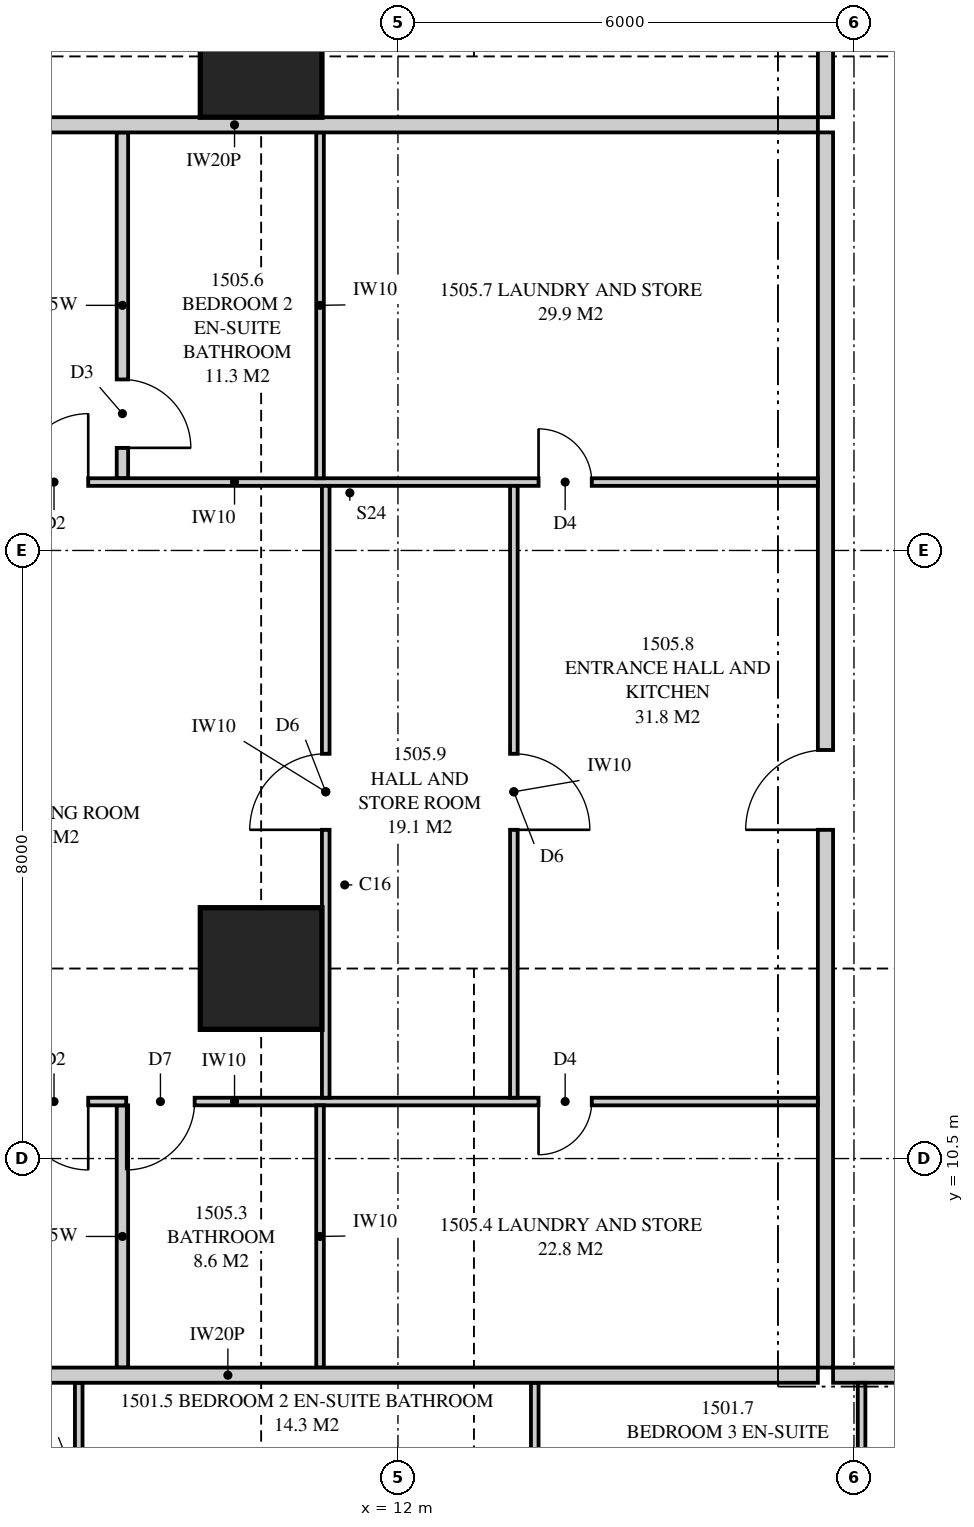
"""IFC4 building model, lengths in metres.
Left out: names, types, materials, properties, quantities, classifications, styles, units other than length and angle.
Written with IfcOpenShell. Run it as: python <this file> out.ifc"""

import sys

from ifc_helpers import new_model, si_unit, direction, frame, frame_2d, origin, origin_2d, place, context, subcontext, project, spatial, polyline, rectangle, outline, extrude, element, fill, save


model = new_model("IFC4")
c1 = context("Model", 3, precision=1e-05, world=origin(), true_north=direction((0.0, 1.0)))
c2 = subcontext(c1, "Body", "Model", "MODEL_VIEW")
j1 = project(units=[si_unit("LENGTHUNIT", "METRE"), si_unit("PLANEANGLEUNIT", "RADIAN")], contexts=[c1])
p1 = place(None, origin())
s1 = spatial("IfcSite", under=j1, at=p1, CompositionType="ELEMENT")
p2 = place(p1, origin())
s2 = spatial("IfcBuilding", under=s1, at=p2, CompositionType="ELEMENT")
p3 = place(p2, frame((0.0, 0.0, 57.85)))
s3 = spatial("IfcBuildingStorey", under=s2, at=p3, CompositionType="ELEMENT", Elevation=57.85)
for number, where, z_axis, x_axis in (
    (1, (10.2, 13.0, 0.0), (0.0, 0.0, 1.0), (1.0, 0.0, 0.0)),
    (2, (10.2, 25.0, 0.0), (0.0, 0.0, 1.0), (1.0, 0.0, 0.0)),
):
    element("IfcColumn", number, at=place(p3, frame(where, z_axis=z_axis, x_axis=x_axis)), inside=s3, PredefinedType="COLUMN", context=c2, shape_type="SweptSolid", body=[
        extrude(rectangle(XDim=1.6, YDim=1.6, at=origin_2d()), origin(), (0.0, 0.0, 1.0), 3.35),
    ])
p4 = place(p3, frame((17.725, 7.65, 0.0), z_axis=(0.0, 0.0, 1.0), x_axis=(1.0, 0.0, 0.0)))
e3 = element("IfcWall", 3, at=p4, inside=s3, PredefinedType="PARTITIONING", context=c2, shape_type="SweptSolid", body=[
    extrude(rectangle(XDim=3.525, YDim=0.2, at=frame_2d((1.762, 0.0))), origin(), (0.0, 0.0, 1.0), 3.11),
])
p5 = place(p3, frame((7.8, 0.175, 0.0), z_axis=(0.0, 0.0, 1.0), x_axis=(0.0, 1.0, 0.0)))
e4 = element("IfcWall", 4, at=p5, inside=s3, PredefinedType="PARTITIONING", context=c2, shape_type="SweptSolid", body=[
    extrude(outline(polyline([(0.0, 0.0), (7.375, 0.0), (7.375, 3.11), (2.697, 3.11), (2.697, 2.15), (0.943, 2.15), (0.943, 3.11), (0.0, 3.11), (0.0, 0.0)])), frame((0.0, 0.05, 0.0), z_axis=(0.0, -1.0, 0.0), x_axis=(1.0, 0.0, 0.0)), (0.0, 0.0, 1.0), 0.1),
])
p6 = place(p5, frame((2.772, 0.0, 0.0)))
e5 = element("IfcOpeningElement", 5, at=p6, cuts=e4, PredefinedType="OPENING", context=c2, shape_type="SweptSolid", body=[
    extrude(rectangle(XDim=0.9, YDim=2.1, at=frame_2d((0.45, 1.05))), frame((0.0, 0.06, 0.0), z_axis=(0.0, -1.0, 0.0), x_axis=(1.0, 0.0, 0.0)), (0.0, 0.0, 1.0), 0.12),
])
p7 = place(p5, frame((5.523, 0.0, 0.0)))
e6 = element("IfcOpeningElement", 6, at=p7, cuts=e4, PredefinedType="OPENING", context=c2, shape_type="SweptSolid", body=[
    extrude(rectangle(XDim=0.9, YDim=2.1, at=frame_2d((0.45, 1.05))), frame((0.0, 0.06, 0.0), z_axis=(0.0, -1.0, 0.0), x_axis=(1.0, 0.0, 0.0)), (0.0, 0.0, 1.0), 0.12),
])
p8 = place(p3, frame((13.8, 0.175, 0.0), z_axis=(0.0, 0.0, 1.0), x_axis=(0.0, 1.0, 0.0)))
e7 = element("IfcWall", 7, at=p8, inside=s3, PredefinedType="PARTITIONING", context=c2, shape_type="SweptSolid", body=[
    extrude(outline(polyline([(1.635, 2.15), (0.0, 2.15), (0.0, 0.0), (7.375, 0.0), (7.375, 3.11), (1.635, 3.11), (1.635, 2.15)]), holes=[polyline([(1.021, 0.133), (0.529, 0.133), (0.529, 0.923), (1.021, 0.923), (1.021, 0.133)]), polyline([(1.021, 1.227), (0.529, 1.227), (0.529, 2.017), (1.021, 2.017), (1.021, 1.227)])]), frame((0.0, 0.05, 0.0), z_axis=(0.0, -1.0, 0.0), x_axis=(1.0, 0.0, 0.0)), (0.0, 0.0, 1.0), 0.1),
])
p9 = place(p8, frame((3.525, 0.0, 0.0)))
e8 = element("IfcOpeningElement", 8, at=p9, cuts=e7, PredefinedType="OPENING", context=c2, shape_type="SweptSolid", body=[
    extrude(rectangle(XDim=0.9, YDim=2.1, at=frame_2d((0.45, 1.05))), frame((0.0, 0.06, 0.0), z_axis=(0.0, -1.0, 0.0), x_axis=(1.0, 0.0, 0.0)), (0.0, 0.0, 1.0), 0.12),
])
p10 = place(p3, frame((18.1, 0.175, 0.0), z_axis=(0.0, 0.0, 1.0), x_axis=(0.0, 1.0, 0.0)))
e9 = element("IfcWall", 9, at=p10, inside=s3, PredefinedType="PARTITIONING", context=c2, shape_type="SweptSolid", body=[
    extrude(outline(polyline([(0.0, 0.0), (7.375, 0.0), (7.375, 3.11), (1.635, 3.11), (1.635, 2.15), (0.0, 2.15), (0.0, 3.11), (0.0, 0.0)])), frame((0.0, 0.05, 0.0), z_axis=(0.0, -1.0, 0.0), x_axis=(1.0, 0.0, 0.0)), (0.0, 0.0, 1.0), 0.1),
])
p11 = place(p10, frame((3.525, 0.0, 0.0)))
e10 = element("IfcOpeningElement", 10, at=p11, cuts=e9, PredefinedType="OPENING", context=c2, shape_type="SweptSolid", body=[
    extrude(rectangle(XDim=0.9, YDim=2.1, at=frame_2d((0.45, 1.05))), frame((0.0, 0.06, 0.0), z_axis=(0.0, -1.0, 0.0), x_axis=(1.0, 0.0, 0.0)), (0.0, 0.0, 1.0), 0.12),
])
p12 = place(p3, frame((2.0, 7.65, 0.0), z_axis=(0.0, 0.0, 1.0), x_axis=(1.0, 0.0, 0.0)))
e11 = element("IfcWall", 11, at=p12, inside=s3, PredefinedType="PARTITIONING", context=c2, shape_type="SweptSolid", body=[
    extrude(outline(polyline([(0.0, 0.0), (15.525, 0.0), (15.525, 3.11), (11.337, 3.11), (11.337, 2.541), (10.663, 2.541), (10.663, 3.11), (9.51, 3.11), (9.51, 2.51), (6.89, 2.51), (6.89, 3.11), (2.969, 3.11), (2.969, 2.541), (2.74, 2.541), (2.74, 2.15), (0.896, 2.15), (0.896, 3.11), (0.0, 3.11), (0.0, 0.0)])), frame((0.0, 0.1, 0.0), z_axis=(0.0, -1.0, 0.0), x_axis=(1.0, 0.0, 0.0)), (0.0, 0.0, 1.0), 0.2),
])
p13 = place(p3, frame((2.175, 24.1, 0.0), z_axis=(0.0, 0.0, 1.0), x_axis=(1.0, 0.0, 0.0)))
e12 = element("IfcWall", 12, at=p13, inside=s3, PredefinedType="PARTITIONING", context=c2, shape_type="SweptSolid", body=[
    extrude(outline(polyline([(0.529, 2.15), (0.0, 2.15), (0.0, 0.0), (0.529, 0.0), (0.529, 0.889), (1.021, 0.889), (1.021, 0.0), (15.35, 0.0), (15.35, 3.11), (9.335, 3.11), (9.335, 2.51), (6.715, 2.51), (6.715, 3.11), (1.685, 3.11), (1.685, 2.15), (1.021, 2.15), (1.021, 1.261), (0.529, 1.261), (0.529, 2.15)])), frame((0.0, 0.1, 0.0), z_axis=(0.0, -1.0, 0.0), x_axis=(1.0, 0.0, 0.0)), (0.0, 0.0, 1.0), 0.2),
])
p14 = place(p3, frame((17.625, 7.75, 0.0), z_axis=(0.0, 0.0, 1.0), x_axis=(0.0, 1.0, 0.0)))
e13 = element("IfcWall", 13, at=p14, inside=s3, PredefinedType="PARTITIONING", context=c2, shape_type="SweptSolid", body=[
    extrude(outline(polyline([(0.0, 0.0), (16.25, 0.0), (16.25, 3.11), (5.587, 3.11), (5.587, 2.541), (4.913, 2.541), (4.913, 3.11), (0.0, 3.11), (0.0, 0.0)])), frame((0.0, 0.1, 0.0), z_axis=(0.0, -1.0, 0.0), x_axis=(1.0, 0.0, 0.0)), (0.0, 0.0, 1.0), 0.2),
])
p15 = place(p14, frame((7.075, 0.0, 0.0)))
e14 = element("IfcOpeningElement", 14, at=p15, cuts=e13, PredefinedType="OPENING", context=c2, shape_type="SweptSolid", body=[
    extrude(rectangle(XDim=1.05, YDim=2.2, at=frame_2d((0.525, 1.1))), frame((0.0, 0.11, 0.0), z_axis=(0.0, -1.0, 0.0), x_axis=(1.0, 0.0, 0.0)), (0.0, 0.0, 1.0), 0.22),
])
p16 = place(p3, frame((2.175, 11.25, 0.0), z_axis=(0.0, 0.0, 1.0), x_axis=(1.0, 0.0, 0.0)))
e15 = element("IfcWall", 15, at=p16, inside=s3, PredefinedType="PARTITIONING", context=c2, shape_type="SweptSolid", body=[
    extrude(outline(polyline([(0.188, 3.11), (0.0, 3.11), (0.0, 0.0), (0.529, 0.0), (0.529, 0.273), (1.021, 0.273), (1.021, 0.0), (15.35, 0.0), (15.35, 3.11), (11.112, 3.11), (11.112, 2.541), (10.538, 2.541), (10.538, 3.11), (9.285, 3.11), (9.285, 2.51), (6.765, 2.51), (6.765, 3.11), (2.744, 3.11), (2.744, 2.541), (2.169, 2.541), (2.169, 3.11), (1.93, 3.11), (1.93, 2.15), (1.021, 2.15), (1.021, 1.876), (0.529, 1.876), (0.529, 2.15), (0.188, 2.15), (0.188, 3.11)])), frame((0.0, 0.05, 0.0), z_axis=(0.0, -1.0, 0.0), x_axis=(1.0, 0.0, 0.0)), (0.0, 0.0, 1.0), 0.1),
])
p17 = place(p16, frame((4.85, 0.0, 0.0)))
e16 = element("IfcOpeningElement", 16, at=p17, cuts=e15, PredefinedType="OPENING", context=c2, shape_type="SweptSolid", body=[
    extrude(rectangle(XDim=0.9, YDim=2.1, at=frame_2d((0.45, 1.05))), frame((0.0, 0.06, 0.0), z_axis=(0.0, -1.0, 0.0), x_axis=(1.0, 0.0, 0.0)), (0.0, 0.0, 1.0), 0.12),
])
p18 = place(p16, frame((6.25, 0.0, 0.0)))
e17 = element("IfcOpeningElement", 17, at=p18, cuts=e15, PredefinedType="OPENING", context=c2, shape_type="SweptSolid", body=[
    extrude(rectangle(XDim=0.9, YDim=2.1, at=frame_2d((0.45, 1.05))), frame((0.0, 0.06, 0.0), z_axis=(0.0, -1.0, 0.0), x_axis=(1.0, 0.0, 0.0)), (0.0, 0.0, 1.0), 0.12),
])
p19 = place(p16, frame((11.675, 0.0, 0.0)))
e18 = element("IfcOpeningElement", 18, at=p19, cuts=e15, PredefinedType="OPENING", context=c2, shape_type="SweptSolid", body=[
    extrude(rectangle(XDim=0.7, YDim=2.1, at=frame_2d((0.35, 1.05))), frame((0.0, 0.06, 0.0), z_axis=(0.0, -1.0, 0.0), x_axis=(1.0, 0.0, 0.0)), (0.0, 0.0, 1.0), 0.12),
])
p20 = place(p3, frame((2.175, 19.4, 0.0), z_axis=(0.0, 0.0, 1.0), x_axis=(1.0, 0.0, 0.0)))
e19 = element("IfcWall", 19, at=p20, inside=s3, PredefinedType="PARTITIONING", context=c2, shape_type="SweptSolid", body=[
    extrude(outline(polyline([(0.0, 0.0), (15.35, 0.0), (15.35, 3.11), (9.285, 3.11), (9.285, 2.51), (6.765, 2.51), (6.765, 3.11), (1.635, 3.11), (1.635, 2.15), (0.0, 2.15), (0.0, 3.11), (0.0, 0.0)])), frame((0.0, 0.05, 0.0), z_axis=(0.0, -1.0, 0.0), x_axis=(1.0, 0.0, 0.0)), (0.0, 0.0, 1.0), 0.1),
])
p21 = place(p20, frame((4.85, 0.0, 0.0)))
e20 = element("IfcOpeningElement", 20, at=p21, cuts=e19, PredefinedType="OPENING", context=c2, shape_type="SweptSolid", body=[
    extrude(rectangle(XDim=0.9, YDim=2.1, at=frame_2d((0.45, 1.05))), frame((0.0, 0.06, 0.0), z_axis=(0.0, -1.0, 0.0), x_axis=(1.0, 0.0, 0.0)), (0.0, 0.0, 1.0), 0.12),
])
p22 = place(p20, frame((11.675, 0.0, 0.0)))
e21 = element("IfcOpeningElement", 21, at=p22, cuts=e19, PredefinedType="OPENING", context=c2, shape_type="SweptSolid", body=[
    extrude(rectangle(XDim=0.7, YDim=2.1, at=frame_2d((0.35, 1.05))), frame((0.0, 0.06, 0.0), z_axis=(0.0, -1.0, 0.0), x_axis=(1.0, 0.0, 0.0)), (0.0, 0.0, 1.0), 0.12),
])
p23 = place(p3, frame((8.375, 7.75, 0.0), z_axis=(0.0, 0.0, 1.0), x_axis=(0.0, 1.0, 0.0)))
e22 = element("IfcWall", 22, at=p23, inside=s3, PredefinedType="PLUMBINGWALL", context=c2, shape_type="SweptSolid", body=[
    extrude(rectangle(XDim=3.45, YDim=0.15, at=frame_2d((1.725, 0.0))), origin(), (0.0, 0.0, 1.0), 3.11),
])
p24 = place(p3, frame((10.975, 7.75, 0.0), z_axis=(0.0, 0.0, 1.0), x_axis=(0.0, 1.0, 0.0)))
e23 = element("IfcWall", 23, at=p24, inside=s3, PredefinedType="PARTITIONING", context=c2, shape_type="SweptSolid", body=[
    extrude(outline(polyline([(0.0, 0.0), (3.45, 0.0), (3.45, 3.11), (3.45, 2.51), (0.0, 2.51), (0.0, 3.11), (0.0, 0.0)])), frame((0.0, 0.05, 0.0), z_axis=(0.0, -1.0, 0.0), x_axis=(1.0, 0.0, 0.0)), (0.0, 0.0, 1.0), 0.1),
])
p25 = place(p3, frame((8.375, 19.45, 0.0), z_axis=(0.0, 0.0, 1.0), x_axis=(0.0, 1.0, 0.0)))
e24 = element("IfcWall", 24, at=p25, inside=s3, PredefinedType="PLUMBINGWALL", context=c2, shape_type="SweptSolid", body=[
    extrude(rectangle(XDim=4.55, YDim=0.15, at=frame_2d((2.275, 0.0))), origin(), (0.0, 0.0, 1.0), 3.11),
])
p26 = place(p25, frame((0.4, 0.0, 0.0)))
e25 = element("IfcOpeningElement", 25, at=p26, cuts=e24, PredefinedType="OPENING", context=c2, shape_type="SweptSolid", body=[
    extrude(rectangle(XDim=0.9, YDim=2.1, at=frame_2d((0.45, 1.05))), frame((0.0, 0.085, 0.0), z_axis=(0.0, -1.0, 0.0), x_axis=(1.0, 0.0, 0.0)), (0.0, 0.0, 1.0), 0.17),
])
p27 = place(p3, frame((10.975, 19.45, 0.0), z_axis=(0.0, 0.0, 1.0), x_axis=(0.0, 1.0, 0.0)))
e26 = element("IfcWall", 26, at=p27, inside=s3, PredefinedType="PARTITIONING", context=c2, shape_type="SweptSolid", body=[
    extrude(outline(polyline([(0.0, 0.0), (4.55, 0.0), (4.55, 3.11), (4.55, 2.51), (0.0, 2.51), (0.0, 3.11), (0.0, 0.0)])), frame((0.0, 0.05, 0.0), z_axis=(0.0, -1.0, 0.0), x_axis=(1.0, 0.0, 0.0)), (0.0, 0.0, 1.0), 0.1),
])
p28 = place(p3, frame((13.525, 11.3, 0.0), z_axis=(0.0, 0.0, 1.0), x_axis=(0.0, 1.0, 0.0)))
e27 = element("IfcWall", 27, at=p28, inside=s3, PredefinedType="PARTITIONING", context=c2, shape_type="SweptSolid", body=[
    extrude(outline(polyline([(0.0, 0.0), (8.05, 0.0), (8.05, 3.11), (1.987, 3.11), (1.987, 2.541), (1.413, 2.541), (1.413, 3.11), (0.0, 3.11), (0.0, 0.0)])), frame((0.0, 0.05, 0.0), z_axis=(0.0, -1.0, 0.0), x_axis=(1.0, 0.0, 0.0)), (0.0, 0.0, 1.0), 0.1),
])
p29 = place(p28, frame((3.525, 0.0, 0.0)))
e28 = element("IfcOpeningElement", 28, at=p29, cuts=e27, PredefinedType="OPENING", context=c2, shape_type="SweptSolid", body=[
    extrude(rectangle(XDim=1.0, YDim=2.1, at=frame_2d((0.5, 1.05))), frame((0.0, 0.06, 0.0), z_axis=(0.0, -1.0, 0.0), x_axis=(1.0, 0.0, 0.0)), (0.0, 0.0, 1.0), 0.12),
])
p30 = place(p3, frame((11.05, 11.3, 0.0), z_axis=(0.0, 0.0, 1.0), x_axis=(0.0, 1.0, 0.0)))
e29 = element("IfcWall", 29, at=p30, inside=s3, PredefinedType="PARTITIONING", context=c2, shape_type="SweptSolid", body=[
    extrude(rectangle(XDim=8.05, YDim=0.1, at=frame_2d((4.025, 0.0))), origin(), (0.0, 0.0, 1.0), 2.51),
])
p31 = place(p30, frame((3.525, 0.0, 0.0)))
e30 = element("IfcOpeningElement", 30, at=p31, cuts=e29, PredefinedType="OPENING", context=c2, shape_type="SweptSolid", body=[
    extrude(rectangle(XDim=1.0, YDim=2.1, at=frame_2d((0.5, 1.05))), frame((0.0, 0.06, 0.0), z_axis=(0.0, -1.0, 0.0), x_axis=(1.0, 0.0, 0.0)), (0.0, 0.0, 1.0), 0.12),
])
p32 = place(p3, frame((17.625, 24.2, 0.0), z_axis=(0.0, 0.0, 1.0), x_axis=(0.0, 1.0, 0.0)))
e31 = element("IfcWall", 31, at=p32, inside=s3, PredefinedType="PARTITIONING", context=c2, shape_type="SweptSolid", body=[
    extrude(outline(polyline([(0.0, 0.0), (5.05, 0.0), (5.05, 3.11), (1.137, 3.11), (1.137, 2.541), (0.463, 2.541), (0.463, 3.11), (0.0, 3.11), (0.0, 0.0)])), frame((0.0, 0.1, 0.0), z_axis=(0.0, -1.0, 0.0), x_axis=(1.0, 0.0, 0.0)), (0.0, 0.0, 1.0), 0.2),
])
p33 = place(p32, frame((1.075, 0.0, 0.0)))
e32 = element("IfcOpeningElement", 32, at=p33, cuts=e31, PredefinedType="OPENING", context=c2, shape_type="SweptSolid", body=[
    extrude(rectangle(XDim=1.8, YDim=2.1, at=frame_2d((0.9, 1.05))), frame((0.0, 0.11, 0.0), z_axis=(0.0, -1.0, 0.0), x_axis=(1.0, 0.0, 0.0)), (0.0, 0.0, 1.0), 0.22),
])
p34 = place(p15, origin())
e33 = element("IfcDoor", 33, at=p34, inside=s3, OperationType="SINGLE_SWING_LEFT", PredefinedType="DOOR", context=c2, shape_type="SweptSolid", body=[
    extrude(rectangle(XDim=1.05, YDim=2.2, at=frame_2d((0.525, 1.1))), frame((0.0, 0.025, 0.0), z_axis=(0.0, -1.0, 0.0), x_axis=(1.0, 0.0, 0.0)), (0.0, 0.0, 1.0), 0.05),
])
fill(e14, e33)
p35 = place(p17, frame((0.9, 0.0, 0.0), z_axis=(0.0, 0.0, 1.0), x_axis=(-1.0, 0.0, 0.0)))
e34 = element("IfcDoor", 34, at=p35, inside=s3, OperationType="SINGLE_SWING_LEFT", PredefinedType="DOOR", context=c2, shape_type="SweptSolid", body=[
    extrude(rectangle(XDim=0.9, YDim=2.1, at=frame_2d((0.45, 1.05))), frame((0.0, 0.025, 0.0), z_axis=(0.0, -1.0, 0.0), x_axis=(1.0, 0.0, 0.0)), (0.0, 0.0, 1.0), 0.05),
])
fill(e16, e34)
p36 = place(p18, frame((0.9, 0.0, 0.0), z_axis=(0.0, 0.0, 1.0), x_axis=(-1.0, 0.0, 0.0)))
e35 = element("IfcDoor", 35, at=p36, inside=s3, OperationType="SINGLE_SWING_RIGHT", PredefinedType="DOOR", context=c2, shape_type="SweptSolid", body=[
    extrude(rectangle(XDim=0.9, YDim=2.1, at=frame_2d((0.45, 1.05))), frame((0.0, 0.025, 0.0), z_axis=(0.0, -1.0, 0.0), x_axis=(1.0, 0.0, 0.0)), (0.0, 0.0, 1.0), 0.05),
])
fill(e17, e35)
p37 = place(p19, frame((0.7, 0.0, 0.0), z_axis=(0.0, 0.0, 1.0), x_axis=(-1.0, 0.0, 0.0)))
e36 = element("IfcDoor", 36, at=p37, inside=s3, OperationType="SINGLE_SWING_RIGHT", PredefinedType="DOOR", context=c2, shape_type="SweptSolid", body=[
    extrude(rectangle(XDim=0.7, YDim=2.1, at=frame_2d((0.35, 1.05))), frame((0.0, 0.025, 0.0), z_axis=(0.0, -1.0, 0.0), x_axis=(1.0, 0.0, 0.0)), (0.0, 0.0, 1.0), 0.05),
])
fill(e18, e36)
p38 = place(p21, origin())
e37 = element("IfcDoor", 37, at=p38, inside=s3, OperationType="SINGLE_SWING_RIGHT", PredefinedType="DOOR", context=c2, shape_type="SweptSolid", body=[
    extrude(rectangle(XDim=0.9, YDim=2.1, at=frame_2d((0.45, 1.05))), frame((0.0, 0.025, 0.0), z_axis=(0.0, -1.0, 0.0), x_axis=(1.0, 0.0, 0.0)), (0.0, 0.0, 1.0), 0.05),
])
fill(e20, e37)
p39 = place(p26, frame((0.9, 0.0, 0.0), z_axis=(0.0, 0.0, 1.0), x_axis=(-1.0, 0.0, 0.0)))
e38 = element("IfcDoor", 38, at=p39, inside=s3, OperationType="SINGLE_SWING_RIGHT", PredefinedType="DOOR", context=c2, shape_type="SweptSolid", body=[
    extrude(rectangle(XDim=0.9, YDim=2.1, at=frame_2d((0.45, 1.05))), frame((0.0, 0.025, 0.0), z_axis=(0.0, -1.0, 0.0), x_axis=(1.0, 0.0, 0.0)), (0.0, 0.0, 1.0), 0.05),
])
fill(e25, e38)
p40 = place(p22, origin())
e39 = element("IfcDoor", 39, at=p40, inside=s3, OperationType="SINGLE_SWING_LEFT", PredefinedType="DOOR", context=c2, shape_type="SweptSolid", body=[
    extrude(rectangle(XDim=0.7, YDim=2.1, at=frame_2d((0.35, 1.05))), frame((0.0, 0.025, 0.0), z_axis=(0.0, -1.0, 0.0), x_axis=(1.0, 0.0, 0.0)), (0.0, 0.0, 1.0), 0.05),
])
fill(e21, e39)
p41 = place(p29, frame((1.0, 0.0, 0.0), z_axis=(0.0, 0.0, 1.0), x_axis=(-1.0, 0.0, 0.0)))
e40 = element("IfcDoor", 40, at=p41, inside=s3, OperationType="SINGLE_SWING_RIGHT", PredefinedType="DOOR", context=c2, shape_type="SweptSolid", body=[
    extrude(rectangle(XDim=1.0, YDim=2.1, at=frame_2d((0.5, 1.05))), frame((0.0, 0.025, 0.0), z_axis=(0.0, -1.0, 0.0), x_axis=(1.0, 0.0, 0.0)), (0.0, 0.0, 1.0), 0.05),
])
fill(e28, e40)
p42 = place(p31, origin())
e41 = element("IfcDoor", 41, at=p42, inside=s3, OperationType="SINGLE_SWING_LEFT", PredefinedType="DOOR", context=c2, shape_type="SweptSolid", body=[
    extrude(rectangle(XDim=1.0, YDim=2.1, at=frame_2d((0.5, 1.05))), frame((0.0, 0.025, 0.0), z_axis=(0.0, -1.0, 0.0), x_axis=(1.0, 0.0, 0.0)), (0.0, 0.0, 1.0), 0.05),
])
fill(e30, e41)
save(model, sys.argv[1])
